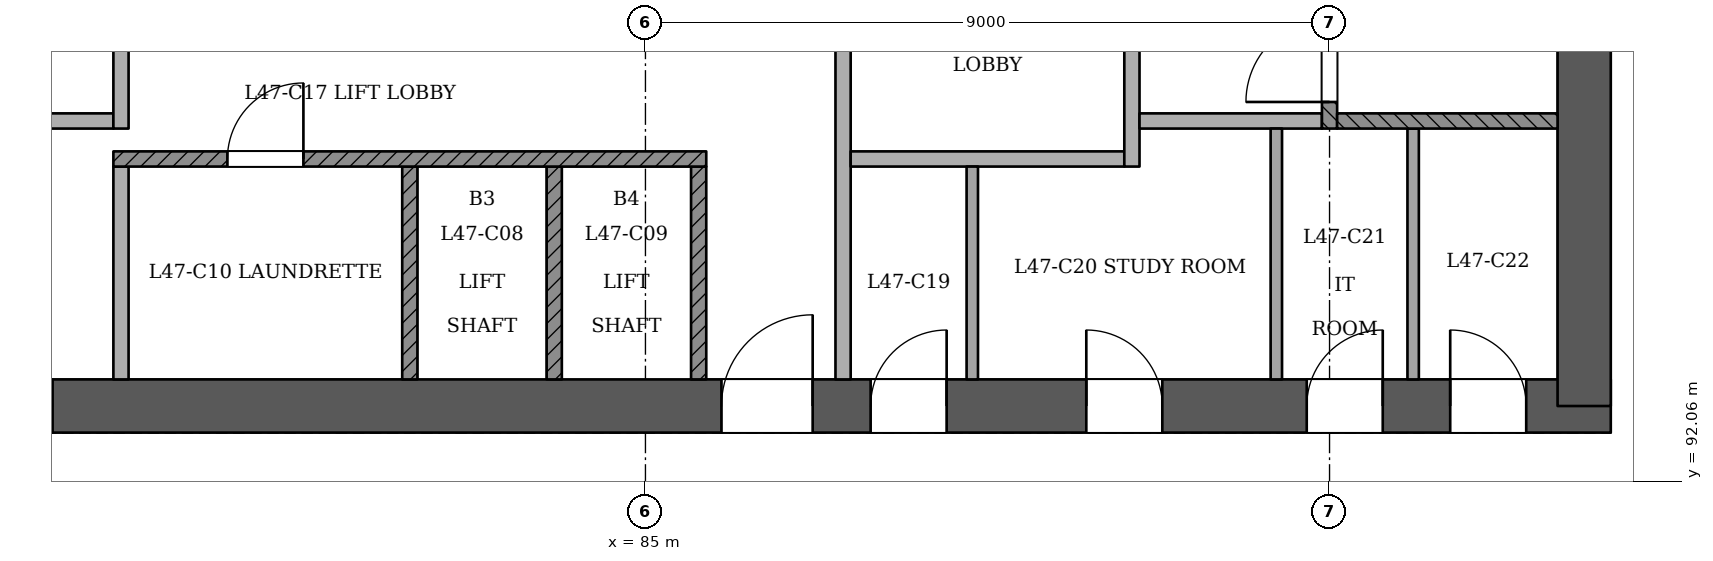
"""IFC4 building model, lengths in metres.
Left out: names, types, materials, properties, quantities, classifications, styles, units other than length and angle.
Written with IfcOpenShell. Run it as: python <this file> out.ifc"""

import sys

from ifc_helpers import new_model, si_unit, direction, frame, frame_2d, origin, place, context, subcontext, project, spatial, rectangle, extrude, element, fill, save


model = new_model("IFC4")
c1 = context("Model", 3, precision=1e-05, world=origin(), true_north=direction((0.0, 1.0)))
c2 = subcontext(c1, "Body", "Model", "MODEL_VIEW")
j1 = project(units=[si_unit("LENGTHUNIT", "METRE"), si_unit("PLANEANGLEUNIT", "RADIAN")], contexts=[c1])
p1 = place(None, origin())
s1 = spatial("IfcSite", under=j1, at=p1, CompositionType="ELEMENT")
p2 = place(p1, origin())
s2 = spatial("IfcBuilding", under=s1, at=p2, CompositionType="ELEMENT")
p3 = place(p2, frame((0.0, 0.0, 181.8)))
s3 = spatial("IfcBuildingStorey", under=s2, at=p3, CompositionType="ELEMENT", Elevation=181.8)
p4 = place(p3, frame((72.65, 93.05, 0.0), z_axis=(0.0, 0.0, 1.0), x_axis=(1.0, 0.0, 0.0)))
e1 = element("IfcWall", 1, at=p4, inside=s3, PredefinedType="SHEAR", context=c2, shape_type="SweptSolid", body=[
    extrude(rectangle(XDim=25.05, YDim=0.7, at=frame_2d((12.525, 0.0))), origin(), (0.0, 0.0, 1.0), 3.6),
])
p5 = place(p4, frame((1.15, 0.0, 0.0)))
e2 = element("IfcOpeningElement", 2, at=p5, cuts=e1, PredefinedType="OPENING", context=c2, shape_type="SweptSolid", body=[
    extrude(rectangle(XDim=1.2, YDim=2.1, at=frame_2d((0.6, 1.05))), frame((0.0, 0.36, 0.0), z_axis=(0.0, -1.0, 0.0), x_axis=(1.0, 0.0, 0.0)), (0.0, 0.0, 1.0), 0.721),
])
p6 = place(p4, frame((3.35, 0.0, 0.0)))
e3 = element("IfcOpeningElement", 3, at=p6, cuts=e1, PredefinedType="OPENING", context=c2, shape_type="SweptSolid", body=[
    extrude(rectangle(XDim=1.2, YDim=2.1, at=frame_2d((0.6, 1.05))), frame((0.0, 0.36, 0.0), z_axis=(0.0, -1.0, 0.0), x_axis=(1.0, 0.0, 0.0)), (0.0, 0.0, 1.0), 0.721),
])
p7 = place(p4, frame((13.35, 0.0, 0.0)))
e4 = element("IfcOpeningElement", 4, at=p7, cuts=e1, PredefinedType="OPENING", context=c2, shape_type="SweptSolid", body=[
    extrude(rectangle(XDim=1.2, YDim=2.1, at=frame_2d((0.6, 1.05))), frame((0.0, 0.36, 0.0), z_axis=(0.0, -1.0, 0.0), x_axis=(1.0, 0.0, 0.0)), (0.0, 0.0, 1.0), 0.721),
])
p8 = place(p4, frame((15.312, 0.0, 0.0)))
e5 = element("IfcOpeningElement", 5, at=p8, cuts=e1, PredefinedType="OPENING", context=c2, shape_type="SweptSolid", body=[
    extrude(rectangle(XDim=1.0, YDim=2.1, at=frame_2d((0.5, 1.05))), frame((0.0, 0.36, 0.0), z_axis=(0.0, -1.0, 0.0), x_axis=(1.0, 0.0, 0.0)), (0.0, 0.0, 1.0), 0.721),
])
p9 = place(p4, frame((18.15, 0.0, 0.0)))
e6 = element("IfcOpeningElement", 6, at=p9, cuts=e1, PredefinedType="OPENING", context=c2, shape_type="SweptSolid", body=[
    extrude(rectangle(XDim=1.0, YDim=2.1, at=frame_2d((0.5, 1.05))), frame((0.0, 0.36, 0.0), z_axis=(0.0, -1.0, 0.0), x_axis=(1.0, 0.0, 0.0)), (0.0, 0.0, 1.0), 0.721),
])
p10 = place(p4, frame((21.05, 0.0, 0.0)))
e7 = element("IfcOpeningElement", 7, at=p10, cuts=e1, PredefinedType="OPENING", context=c2, shape_type="SweptSolid", body=[
    extrude(rectangle(XDim=1.0, YDim=2.1, at=frame_2d((0.5, 1.05))), frame((0.0, 0.36, 0.0), z_axis=(0.0, -1.0, 0.0), x_axis=(1.0, 0.0, 0.0)), (0.0, 0.0, 1.0), 0.721),
])
p11 = place(p4, frame((22.938, 0.0, 0.0)))
e8 = element("IfcOpeningElement", 8, at=p11, cuts=e1, PredefinedType="OPENING", context=c2, shape_type="SweptSolid", body=[
    extrude(rectangle(XDim=1.0, YDim=2.1, at=frame_2d((0.5, 1.05))), frame((0.0, 0.36, 0.0), z_axis=(0.0, -1.0, 0.0), x_axis=(1.0, 0.0, 0.0)), (0.0, 0.0, 1.0), 0.721),
])
p12 = place(p3, frame((97.35, 93.05, 0.0), z_axis=(0.0, 0.0, 1.0), x_axis=(0.0, 1.0, 0.0)))
e9 = element("IfcWall", 9, at=p12, inside=s3, PredefinedType="SHEAR", context=c2, shape_type="SweptSolid", body=[
    extrude(rectangle(XDim=11.05, YDim=0.7, at=frame_2d((5.525, 0.0))), origin(), (0.0, 0.0, 1.0), 3.6),
])
p13 = place(p3, frame((78.1, 93.4, 0.0), z_axis=(0.0, 0.0, 1.0), x_axis=(0.0, 1.0, 0.0)))
e10 = element("IfcWall", 10, at=p13, inside=s3, PredefinedType="PARTITIONING", context=c2, shape_type="SweptSolid", body=[
    extrude(rectangle(XDim=2.8, YDim=0.2, at=frame_2d((1.4, 0.0))), origin(), (0.0, 0.0, 1.0), 3.15),
])
for number, where, z_axis, x_axis in (
    (11, (81.9, 93.4, 0.0), (0.0, 0.0, 1.0), (0.0, 1.0, 0.0)),
    (12, (83.8, 93.4, 0.0), (0.0, 0.0, 1.0), (0.0, 1.0, 0.0)),
    (13, (85.7, 93.4, 0.0), (0.0, 0.0, 1.0), (0.0, 1.0, 0.0)),
):
    element("IfcWall", number, at=place(p3, frame(where, z_axis=z_axis, x_axis=x_axis)), inside=s3, PredefinedType="SOLIDWALL", context=c2, shape_type="SweptSolid", body=[
        extrude(rectangle(XDim=2.8, YDim=0.2, at=frame_2d((1.4, 0.0))), origin(), (0.0, 0.0, 1.0), 3.15),
    ])
p14 = place(p3, frame((87.6, 93.4, 0.0), z_axis=(0.0, 0.0, 1.0), x_axis=(0.0, 1.0, 0.0)))
e14 = element("IfcWall", 14, at=p14, inside=s3, PredefinedType="PARTITIONING", context=c2, shape_type="SweptSolid", body=[
    extrude(rectangle(XDim=7.0, YDim=0.2, at=frame_2d((3.5, 0.0))), origin(), (0.0, 0.0, 1.0), 3.15),
])
p15 = place(p14, frame((4.45, 0.0, 0.0)))
e15 = element("IfcOpeningElement", 15, at=p15, cuts=e14, PredefinedType="OPENING", context=c2, shape_type="SweptSolid", body=[
    extrude(rectangle(XDim=1.1, YDim=2.1, at=frame_2d((0.55, 1.05))), frame((0.0, 0.11, 0.0), z_axis=(0.0, -1.0, 0.0), x_axis=(1.0, 0.0, 0.0)), (0.0, 0.0, 1.0), 0.221),
])
p16 = place(p3, frame((89.3, 93.4, 0.0), z_axis=(0.0, 0.0, 1.0), x_axis=(0.0, 1.0, 0.0)))
e16 = element("IfcWall", 16, at=p16, inside=s3, PredefinedType="PARTITIONING", context=c2, shape_type="SweptSolid", body=[
    extrude(rectangle(XDim=2.8, YDim=0.15, at=frame_2d((1.4, 0.0))), origin(), (0.0, 0.0, 1.0), 3.15),
])
for number, where, z_axis, x_axis in (
    (17, (93.3, 93.4, 0.0), (0.0, 0.0, 1.0), (0.0, 1.0, 0.0)),
    (18, (95.1, 93.4, 0.0), (0.0, 0.0, 1.0), (0.0, 1.0, 0.0)),
):
    element("IfcWall", number, at=place(p3, frame(where, z_axis=z_axis, x_axis=x_axis)), inside=s3, PredefinedType="PARTITIONING", context=c2, shape_type="SweptSolid", body=[
        extrude(rectangle(XDim=3.3, YDim=0.15, at=frame_2d((1.65, 0.0))), origin(), (0.0, 0.0, 1.0), 3.15),
    ])
p17 = place(p3, frame((78.0, 96.3, 0.0), z_axis=(0.0, 0.0, 1.0), x_axis=(1.0, 0.0, 0.0)))
e19 = element("IfcWall", 19, at=p17, inside=s3, PredefinedType="SOLIDWALL", context=c2, shape_type="SweptSolid", body=[
    extrude(rectangle(XDim=7.8, YDim=0.2, at=frame_2d((3.9, 0.0))), origin(), (0.0, 0.0, 1.0), 3.15),
])
p18 = place(p17, frame((1.5, 0.0, 0.0)))
e20 = element("IfcOpeningElement", 20, at=p18, cuts=e19, PredefinedType="OPENING", context=c2, shape_type="SweptSolid", body=[
    extrude(rectangle(XDim=1.0, YDim=2.1, at=frame_2d((0.5, 1.05))), frame((0.0, 0.11, 0.0), z_axis=(0.0, -1.0, 0.0), x_axis=(1.0, 0.0, 0.0)), (0.0, 0.0, 1.0), 0.221),
])
p19 = place(p3, frame((87.7, 96.3, 0.0), z_axis=(0.0, 0.0, 1.0), x_axis=(1.0, 0.0, 0.0)))
e21 = element("IfcWall", 21, at=p19, inside=s3, PredefinedType="PARTITIONING", context=c2, shape_type="SweptSolid", body=[
    extrude(rectangle(XDim=3.6, YDim=0.2, at=frame_2d((1.8, 0.0))), origin(), (0.0, 0.0, 1.0), 3.15),
])
p20 = place(p3, frame((91.4, 96.2, 0.0), z_axis=(0.0, 0.0, 1.0), x_axis=(0.0, 1.0, 0.0)))
e22 = element("IfcWall", 22, at=p20, inside=s3, PredefinedType="PARTITIONING", context=c2, shape_type="SweptSolid", body=[
    extrude(rectangle(XDim=4.2, YDim=0.2, at=frame_2d((2.1, 0.0))), origin(), (0.0, 0.0, 1.0), 3.15),
])
p21 = place(p20, frame((2.45, 0.0, 0.0)))
e23 = element("IfcOpeningElement", 23, at=p21, cuts=e22, PredefinedType="OPENING", context=c2, shape_type="SweptSolid", body=[
    extrude(rectangle(XDim=1.1, YDim=2.1, at=frame_2d((0.55, 1.05))), frame((0.0, 0.11, 0.0), z_axis=(0.0, -1.0, 0.0), x_axis=(1.0, 0.0, 0.0)), (0.0, 0.0, 1.0), 0.221),
])
p22 = place(p3, frame((76.1, 96.8, 0.0), z_axis=(0.0, 0.0, 1.0), x_axis=(1.0, 0.0, 0.0)))
e24 = element("IfcWall", 24, at=p22, inside=s3, PredefinedType="PARTITIONING", context=c2, shape_type="SweptSolid", body=[
    extrude(rectangle(XDim=1.9, YDim=0.2, at=frame_2d((0.95, 0.0))), origin(), (0.0, 0.0, 1.0), 3.15),
])
p23 = place(p3, frame((78.1, 96.7, 0.0), z_axis=(0.0, 0.0, 1.0), x_axis=(0.0, 1.0, 0.0)))
e25 = element("IfcWall", 25, at=p23, inside=s3, PredefinedType="PARTITIONING", context=c2, shape_type="SweptSolid", body=[
    extrude(rectangle(XDim=3.7, YDim=0.2, at=frame_2d((1.85, 0.0))), origin(), (0.0, 0.0, 1.0), 3.15),
])
p24 = place(p23, frame((1.95, 0.0, 0.0)))
e26 = element("IfcOpeningElement", 26, at=p24, cuts=e25, PredefinedType="OPENING", context=c2, shape_type="SweptSolid", body=[
    extrude(rectangle(XDim=1.1, YDim=2.1, at=frame_2d((0.55, 1.05))), frame((0.0, 0.11, 0.0), z_axis=(0.0, -1.0, 0.0), x_axis=(1.0, 0.0, 0.0)), (0.0, 0.0, 1.0), 0.221),
])
p25 = place(p3, frame((91.5, 96.8, 0.0), z_axis=(0.0, 0.0, 1.0), x_axis=(1.0, 0.0, 0.0)))
e27 = element("IfcWall", 27, at=p25, inside=s3, PredefinedType="PARTITIONING", context=c2, shape_type="SweptSolid", body=[
    extrude(rectangle(XDim=2.4, YDim=0.2, at=frame_2d((1.2, 0.0))), origin(), (0.0, 0.0, 1.0), 3.15),
])
p26 = place(p3, frame((94.0, 96.7, 0.0), z_axis=(0.0, 0.0, 1.0), x_axis=(0.0, 1.0, 0.0)))
e28 = element("IfcWall", 28, at=p26, inside=s3, PredefinedType="SOLIDWALL", context=c2, shape_type="SweptSolid", body=[
    extrude(rectangle(XDim=3.7, YDim=0.2, at=frame_2d((1.85, 0.0))), origin(), (0.0, 0.0, 1.0), 3.15),
])
p27 = place(p26, frame((0.35, 0.0, 0.0)))
e29 = element("IfcOpeningElement", 29, at=p27, cuts=e28, PredefinedType="OPENING", context=c2, shape_type="SweptSolid", body=[
    extrude(rectangle(XDim=1.1, YDim=2.1, at=frame_2d((0.55, 1.05))), frame((0.0, 0.11, 0.0), z_axis=(0.0, -1.0, 0.0), x_axis=(1.0, 0.0, 0.0)), (0.0, 0.0, 1.0), 0.221),
])
p28 = place(p3, frame((94.1, 96.8, 0.0), z_axis=(0.0, 0.0, 1.0), x_axis=(1.0, 0.0, 0.0)))
e30 = element("IfcWall", 30, at=p28, inside=s3, PredefinedType="SOLIDWALL", context=c2, shape_type="SweptSolid", body=[
    extrude(rectangle(XDim=2.9, YDim=0.2, at=frame_2d((1.45, 0.0))), origin(), (0.0, 0.0, 1.0), 3.15),
])
p29 = place(p27, origin())
e31 = element("IfcDoor", 31, at=p29, inside=s3, OperationType="SINGLE_SWING_LEFT", PredefinedType="NOTDEFINED", context=c2, shape_type="SweptSolid", body=[
    extrude(rectangle(XDim=1.1, YDim=2.1, at=frame_2d((0.55, 1.05))), frame((0.0, 0.025, 0.0), z_axis=(0.0, -1.0, 0.0), x_axis=(1.0, 0.0, 0.0)), (0.0, 0.0, 1.0), 0.05),
])
fill(e29, e31)
p30 = place(p6, origin())
e32 = element("IfcDoor", 32, at=p30, inside=s3, OperationType="SINGLE_SWING_LEFT", PredefinedType="NOTDEFINED", context=c2, shape_type="SweptSolid", body=[
    extrude(rectangle(XDim=1.2, YDim=2.1, at=frame_2d((0.6, 1.05))), frame((0.0, 0.025, 0.0), z_axis=(0.0, -1.0, 0.0), x_axis=(1.0, 0.0, 0.0)), (0.0, 0.0, 1.0), 0.05),
])
fill(e3, e32)
p31 = place(p7, origin())
e33 = element("IfcDoor", 33, at=p31, inside=s3, OperationType="SINGLE_SWING_RIGHT", PredefinedType="NOTDEFINED", context=c2, shape_type="SweptSolid", body=[
    extrude(rectangle(XDim=1.2, YDim=2.1, at=frame_2d((0.6, 1.05))), frame((0.0, 0.025, 0.0), z_axis=(0.0, -1.0, 0.0), x_axis=(1.0, 0.0, 0.0)), (0.0, 0.0, 1.0), 0.05),
])
fill(e4, e33)
p32 = place(p8, origin())
e34 = element("IfcDoor", 34, at=p32, inside=s3, OperationType="SINGLE_SWING_RIGHT", PredefinedType="NOTDEFINED", context=c2, shape_type="SweptSolid", body=[
    extrude(rectangle(XDim=1.0, YDim=2.1, at=frame_2d((0.5, 1.05))), frame((0.0, 0.025, 0.0), z_axis=(0.0, -1.0, 0.0), x_axis=(1.0, 0.0, 0.0)), (0.0, 0.0, 1.0), 0.05),
])
fill(e5, e34)
p33 = place(p9, origin())
e35 = element("IfcDoor", 35, at=p33, inside=s3, OperationType="SINGLE_SWING_LEFT", PredefinedType="NOTDEFINED", context=c2, shape_type="SweptSolid", body=[
    extrude(rectangle(XDim=1.0, YDim=2.1, at=frame_2d((0.5, 1.05))), frame((0.0, 0.025, 0.0), z_axis=(0.0, -1.0, 0.0), x_axis=(1.0, 0.0, 0.0)), (0.0, 0.0, 1.0), 0.05),
])
fill(e6, e35)
p34 = place(p10, origin())
e36 = element("IfcDoor", 36, at=p34, inside=s3, OperationType="SINGLE_SWING_RIGHT", PredefinedType="NOTDEFINED", context=c2, shape_type="SweptSolid", body=[
    extrude(rectangle(XDim=1.0, YDim=2.1, at=frame_2d((0.5, 1.05))), frame((0.0, 0.025, 0.0), z_axis=(0.0, -1.0, 0.0), x_axis=(1.0, 0.0, 0.0)), (0.0, 0.0, 1.0), 0.05),
])
fill(e7, e36)
p35 = place(p11, origin())
e37 = element("IfcDoor", 37, at=p35, inside=s3, OperationType="SINGLE_SWING_LEFT", PredefinedType="NOTDEFINED", context=c2, shape_type="SweptSolid", body=[
    extrude(rectangle(XDim=1.0, YDim=2.1, at=frame_2d((0.5, 1.05))), frame((0.0, 0.025, 0.0), z_axis=(0.0, -1.0, 0.0), x_axis=(1.0, 0.0, 0.0)), (0.0, 0.0, 1.0), 0.05),
])
fill(e8, e37)
p36 = place(p18, origin())
e38 = element("IfcDoor", 38, at=p36, inside=s3, OperationType="SINGLE_SWING_RIGHT", PredefinedType="NOTDEFINED", context=c2, shape_type="SweptSolid", body=[
    extrude(rectangle(XDim=1.0, YDim=2.1, at=frame_2d((0.5, 1.05))), frame((0.0, 0.025, 0.0), z_axis=(0.0, -1.0, 0.0), x_axis=(1.0, 0.0, 0.0)), (0.0, 0.0, 1.0), 0.05),
])
fill(e20, e38)
save(model, sys.argv[1])
